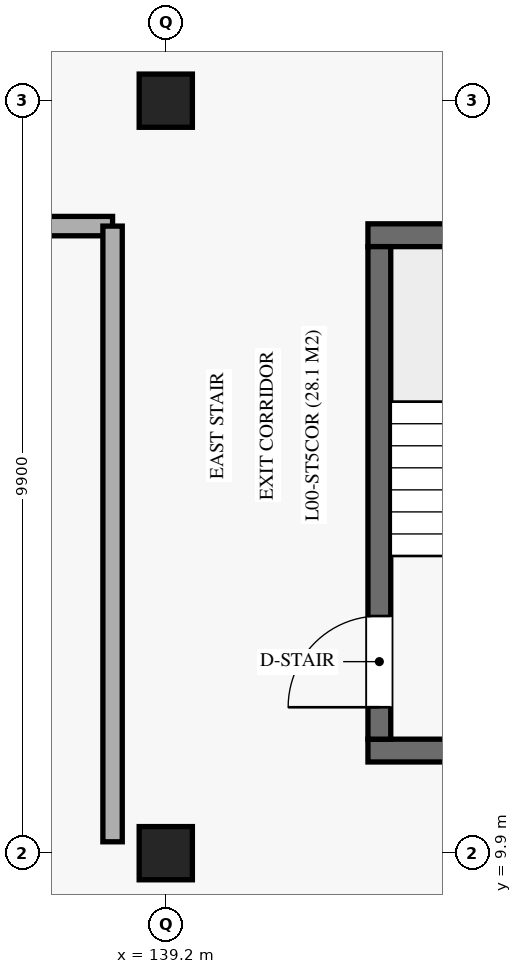
"""IFC4 building model, lengths in metres.
Left out: names, types, materials, properties, quantities, classifications, styles, units other than length and angle.
Written with IfcOpenShell. Run it as: python <this file> out.ifc"""

import sys

from ifc_helpers import new_model, si_unit, direction, frame, frame_2d, origin, origin_2d, place, context, subcontext, project, spatial, rectangle, extrude, element, fill, save


model = new_model("IFC4")
c1 = context("Model", 3, precision=1e-05, world=origin(), true_north=direction((0.0, 1.0)))
c2 = subcontext(c1, "Body", "Model", "MODEL_VIEW")
j1 = project(units=[si_unit("LENGTHUNIT", "METRE"), si_unit("PLANEANGLEUNIT", "RADIAN")], contexts=[c1])
p1 = place(None, origin())
s1 = spatial("IfcSite", under=j1, at=p1, CompositionType="ELEMENT")
p2 = place(p1, origin())
s2 = spatial("IfcBuilding", under=s1, at=p2, CompositionType="ELEMENT")
p3 = place(p2, origin())
s3 = spatial("IfcBuildingStorey", under=s2, at=p3, CompositionType="ELEMENT", Elevation=0.0)
for number, where, z_axis, x_axis in (
    (1, (139.2, 9.9, 0.0), (0.0, 0.0, 1.0), (1.0, 0.0, 0.0)),
    (2, (139.2, 19.8, 0.0), (0.0, 0.0, 1.0), (1.0, 0.0, 0.0)),
):
    element("IfcColumn", number, at=place(p3, frame(where, z_axis=z_axis, x_axis=x_axis)), inside=s3, PredefinedType="COLUMN", context=c2, shape_type="SweptSolid", body=[
        extrude(rectangle(XDim=0.7, YDim=0.7, at=origin_2d()), origin(), (0.0, 0.0, 1.0), 5.44),
    ])
for number, where, z_axis, x_axis in (
    (3, (141.86, 11.25, 0.0), (0.0, 0.0, 1.0), (1.0, 0.0, 0.0)),
    (4, (141.86, 18.03, 0.0), (0.0, 0.0, 1.0), (1.0, 0.0, 0.0)),
):
    element("IfcWall", number, at=place(p3, frame(where, z_axis=z_axis, x_axis=x_axis)), inside=s3, PredefinedType="SHEAR", context=c2, shape_type="SweptSolid", body=[
        extrude(rectangle(XDim=7.08, YDim=0.3, at=frame_2d((3.54, 0.0))), origin(), (0.0, 0.0, 1.0), 5.18),
    ])
p4 = place(p3, frame((142.01, 11.4, 0.0), z_axis=(0.0, 0.0, 1.0), x_axis=(0.0, 1.0, 0.0)))
e5 = element("IfcWall", 5, at=p4, inside=s3, PredefinedType="SHEAR", context=c2, shape_type="SweptSolid", body=[
    extrude(rectangle(XDim=6.48, YDim=0.3, at=frame_2d((3.24, 0.0))), origin(), (0.0, 0.0, 1.0), 5.18),
])
p5 = place(p4, frame((0.42, 0.0, 0.0)))
e6 = element("IfcOpeningElement", 6, at=p5, cuts=e5, PredefinedType="OPENING", context=c2, shape_type="SweptSolid", body=[
    extrude(rectangle(XDim=1.2, YDim=2.2, at=frame_2d((0.6, 1.1))), frame((0.0, 0.16, 0.0), z_axis=(0.0, -1.0, 0.0), x_axis=(1.0, 0.0, 0.0)), (0.0, 0.0, 1.0), 0.32),
])
p6 = place(p3, frame((92.4, 18.15, 0.0), z_axis=(0.0, 0.0, 1.0), x_axis=(1.0, 0.0, 0.0)))
e7 = element("IfcWall", 7, at=p6, inside=s3, PredefinedType="SOLIDWALL", context=c2, shape_type="SweptSolid", body=[
    extrude(rectangle(XDim=46.1, YDim=0.255, at=frame_2d((23.05, 0.0))), origin(), (0.0, 0.0, 1.0), 4.3),
])
p7 = place(p6, frame((36.0, 0.0, 0.0)))
e8 = element("IfcOpeningElement", 8, at=p7, cuts=e7, PredefinedType="OPENING", context=c2, shape_type="SweptSolid", body=[
    extrude(rectangle(XDim=1.6, YDim=2.3, at=frame_2d((0.8, 1.15))), frame((0.0, 0.137, 0.0), z_axis=(0.0, -1.0, 0.0), x_axis=(1.0, 0.0, 0.0)), (0.0, 0.0, 1.0), 0.275),
])
p8 = place(p3, frame((138.5, 10.05, 0.0), z_axis=(0.0, 0.0, 1.0), x_axis=(0.0, 1.0, 0.0)))
e9 = element("IfcWall", 9, at=p8, inside=s3, PredefinedType="SOLIDWALL", context=c2, shape_type="SweptSolid", body=[
    extrude(rectangle(XDim=8.1, YDim=0.255, at=frame_2d((4.05, 0.0))), origin(), (0.0, 0.0, 1.0), 4.3),
])
p9 = place(p5, origin())
e10 = element("IfcDoor", 10, at=p9, inside=s3, OperationType="SINGLE_SWING_LEFT", PredefinedType="DOOR", context=c2, shape_type="SweptSolid", body=[
    extrude(rectangle(XDim=1.2, YDim=2.2, at=frame_2d((0.6, 1.1))), frame((0.0, 0.025, 0.0), z_axis=(0.0, -1.0, 0.0), x_axis=(1.0, 0.0, 0.0)), (0.0, 0.0, 1.0), 0.05),
])
fill(e6, e10)
save(model, sys.argv[1])
